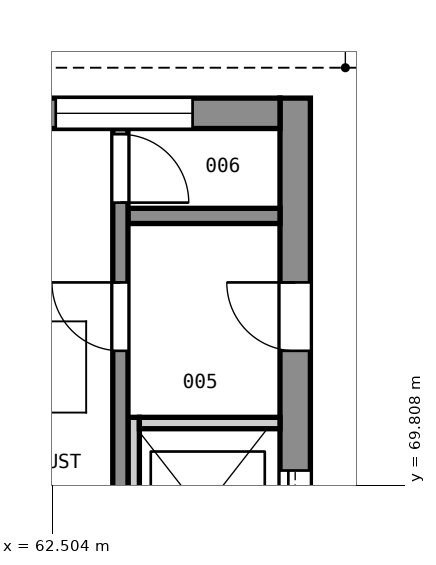
"""IFC4 building model, lengths in metres.
Left out: names, types, materials, properties, quantities, classifications, styles, units other than length and angle.
Written with IfcOpenShell. Run it as: python <this file> out.ifc"""

import sys

from ifc_helpers import new_model, si_unit, direction, frame, frame_2d, origin, place, context, subcontext, project, spatial, rectangle, extrude, element, fill, save


model = new_model("IFC4")
c1 = context("Model", 3, precision=1e-05, world=origin(), true_north=direction((0.0, 1.0)))
c2 = subcontext(c1, "Body", "Model", "MODEL_VIEW")
j1 = project(units=[si_unit("LENGTHUNIT", "METRE"), si_unit("PLANEANGLEUNIT", "RADIAN")], contexts=[c1])
p1 = place(None, origin())
s1 = spatial("IfcSite", under=j1, at=p1, CompositionType="ELEMENT")
p2 = place(p1, origin())
s2 = spatial("IfcBuilding", under=s1, at=p2, CompositionType="ELEMENT")
p3 = place(p2, frame((0.0, 0.0, 75.0)))
s3 = spatial("IfcBuildingStorey", under=s2, at=p3, CompositionType="ELEMENT", Elevation=75.0)
p4 = place(p3, frame((65.7, 60.1, 0.0), z_axis=(0.0, 0.0, 1.0), x_axis=(0.0, 1.0, 0.0)))
e1 = element("IfcWall", 1, at=p4, inside=s3, PredefinedType="SHEAR", context=c2, shape_type="SweptSolid", body=[
    extrude(rectangle(XDim=14.8, YDim=0.4, at=frame_2d((7.4, 0.0))), origin(), (0.0, 0.0, 1.0), 3.6),
])
p5 = place(p4, frame((8.8, 0.0, 0.0)))
e2 = element("IfcOpeningElement", 2, at=p5, cuts=e1, PredefinedType="OPENING", context=c2, shape_type="SweptSolid", body=[
    extrude(rectangle(XDim=1.1, YDim=2.1, at=frame_2d((0.55, 1.05))), frame((0.0, 0.21, 0.0), z_axis=(0.0, -1.0, 0.0), x_axis=(1.0, 0.0, 0.0)), (0.0, 0.0, 1.0), 0.42),
])
p6 = place(p4, frame((0.5, 0.0, 0.0)))
e3 = element("IfcOpeningElement", 3, at=p6, cuts=e1, PredefinedType="OPENING", context=c2, shape_type="SweptSolid", body=[
    extrude(rectangle(XDim=1.4, YDim=2.1, at=frame_2d((0.7, 1.05))), frame((0.0, 0.21, 0.0), z_axis=(0.0, -1.0, 0.0), x_axis=(1.0, 0.0, 0.0)), (0.0, 0.0, 1.0), 0.42),
])
p7 = place(p4, frame((6.5, 0.0, 2.2)))
e4 = element("IfcOpeningElement", 4, at=p7, cuts=e1, PredefinedType="OPENING", context=c2, shape_type="SweptSolid", body=[
    extrude(rectangle(XDim=1.8, YDim=1.2, at=frame_2d((0.9, 0.6))), frame((0.0, 0.21, 0.0), z_axis=(0.0, -1.0, 0.0), x_axis=(1.0, 0.0, 0.0)), (0.0, 0.0, 1.0), 0.42),
])
p8 = place(p4, frame((11.475, 0.0, 0.0)))
e5 = element("IfcOpeningElement", 5, at=p8, cuts=e1, PredefinedType="OPENING", context=c2, shape_type="SweptSolid", body=[
    extrude(rectangle(XDim=0.9, YDim=2.1, at=frame_2d((0.45, 1.05))), frame((0.0, 0.21, 0.0), z_axis=(0.0, -1.0, 0.0), x_axis=(1.0, 0.0, 0.0)), (0.0, 0.0, 1.0), 0.42),
])
p9 = place(p3, frame((61.4, 74.7, 0.0), z_axis=(0.0, 0.0, 1.0), x_axis=(1.0, 0.0, 0.0)))
e6 = element("IfcWall", 6, at=p9, inside=s3, PredefinedType="SHEAR", context=c2, shape_type="SweptSolid", body=[
    extrude(rectangle(XDim=4.1, YDim=0.4, at=frame_2d((2.05, 0.0))), origin(), (0.0, 0.0, 1.0), 3.6),
])
p10 = place(p9, frame((1.15, 0.0, 2.2)))
e7 = element("IfcOpeningElement", 7, at=p10, cuts=e6, PredefinedType="OPENING", context=c2, shape_type="SweptSolid", body=[
    extrude(rectangle(XDim=1.8, YDim=1.2, at=frame_2d((0.9, 0.6))), frame((0.0, 0.21, 0.0), z_axis=(0.0, -1.0, 0.0), x_axis=(1.0, 0.0, 0.0)), (0.0, 0.0, 1.0), 0.42),
])
p11 = place(p3, frame((63.575, 68.2, 0.0), z_axis=(0.0, 0.0, 1.0), x_axis=(0.0, 1.0, 0.0)))
e8 = element("IfcWall", 8, at=p11, inside=s3, PredefinedType="SOLIDWALL", context=c2, shape_type="SweptSolid", body=[
    extrude(rectangle(XDim=2.5, YDim=0.15, at=frame_2d((1.25, 0.0))), origin(), (0.0, 0.0, 1.0), 3.6),
])
p12 = place(p3, frame((63.65, 70.625, 0.0), z_axis=(0.0, 0.0, 1.0), x_axis=(1.0, 0.0, 0.0)))
e9 = element("IfcWall", 9, at=p12, inside=s3, PredefinedType="SOLIDWALL", context=c2, shape_type="SweptSolid", body=[
    extrude(rectangle(XDim=1.85, YDim=0.15, at=frame_2d((0.925, 0.0))), origin(), (0.0, 0.0, 1.0), 3.6),
])
p13 = place(p3, frame((63.5, 73.35, 0.0), z_axis=(0.0, 0.0, 1.0), x_axis=(1.0, 0.0, 0.0)))
e10 = element("IfcWall", 10, at=p13, inside=s3, PredefinedType="SOLIDWALL", context=c2, shape_type="SweptSolid", body=[
    extrude(rectangle(XDim=2.0, YDim=0.2, at=frame_2d((1.0, 0.0))), origin(), (0.0, 0.0, 1.0), 3.6),
])
p14 = place(p3, frame((63.4, 68.225, 0.0), z_axis=(0.0, 0.0, 1.0), x_axis=(0.0, 1.0, 0.0)))
e11 = element("IfcWall", 11, at=p14, inside=s3, PredefinedType="SOLIDWALL", context=c2, shape_type="SweptSolid", body=[
    extrude(rectangle(XDim=6.275, YDim=0.2, at=frame_2d((3.137, 0.0))), origin(), (0.0, 0.0, 1.0), 3.6),
])
p15 = place(p14, frame((3.35, 0.0, 0.0)))
e12 = element("IfcOpeningElement", 12, at=p15, cuts=e11, PredefinedType="OPENING", context=c2, shape_type="SweptSolid", body=[
    extrude(rectangle(XDim=0.9, YDim=2.1, at=frame_2d((0.45, 1.05))), frame((0.0, 0.11, 0.0), z_axis=(0.0, -1.0, 0.0), x_axis=(1.0, 0.0, 0.0)), (0.0, 0.0, 1.0), 0.22),
])
p16 = place(p14, frame((5.3, 0.0, 0.0)))
e13 = element("IfcOpeningElement", 13, at=p16, cuts=e11, PredefinedType="OPENING", context=c2, shape_type="SweptSolid", body=[
    extrude(rectangle(XDim=0.9, YDim=2.1, at=frame_2d((0.45, 1.05))), frame((0.0, 0.11, 0.0), z_axis=(0.0, -1.0, 0.0), x_axis=(1.0, 0.0, 0.0)), (0.0, 0.0, 1.0), 0.22),
])
p17 = place(p5, origin())
e14 = element("IfcDoor", 14, at=p17, inside=s3, OperationType="SLIDING_TO_LEFT", PredefinedType="DOOR", context=c2, shape_type="SweptSolid", body=[
    extrude(rectangle(XDim=1.1, YDim=2.1, at=frame_2d((0.55, 1.05))), frame((0.0, 0.025, 0.0), z_axis=(0.0, -1.0, 0.0), x_axis=(1.0, 0.0, 0.0)), (0.0, 0.0, 1.0), 0.05),
])
fill(e2, e14)
p18 = place(p10, origin())
e15 = element("IfcWindow", 15, at=p18, inside=s3, PartitioningType="SINGLE_PANEL", PredefinedType="USERDEFINED", context=c2, shape_type="SweptSolid", body=[
    extrude(rectangle(XDim=1.8, YDim=1.2, at=frame_2d((0.9, 0.6))), frame((0.0, 0.03, 0.0), z_axis=(0.0, -1.0, 0.0), x_axis=(1.0, 0.0, 0.0)), (0.0, 0.0, 1.0), 0.06),
])
fill(e7, e15)
p19 = place(p8, origin())
e16 = element("IfcDoor", 16, at=p19, inside=s3, OperationType="SINGLE_SWING_RIGHT", PredefinedType="DOOR", context=c2, shape_type="SweptSolid", body=[
    extrude(rectangle(XDim=0.9, YDim=2.1, at=frame_2d((0.45, 1.05))), frame((0.0, 0.025, 0.0), z_axis=(0.0, -1.0, 0.0), x_axis=(1.0, 0.0, 0.0)), (0.0, 0.0, 1.0), 0.05),
])
fill(e5, e16)
p20 = place(p15, origin())
e17 = element("IfcDoor", 17, at=p20, inside=s3, OperationType="SINGLE_SWING_RIGHT", PredefinedType="DOOR", context=c2, shape_type="SweptSolid", body=[
    extrude(rectangle(XDim=0.9, YDim=2.1, at=frame_2d((0.45, 1.05))), frame((0.0, 0.025, 0.0), z_axis=(0.0, -1.0, 0.0), x_axis=(1.0, 0.0, 0.0)), (0.0, 0.0, 1.0), 0.05),
])
fill(e12, e17)
p21 = place(p16, frame((0.9, 0.0, 0.0), z_axis=(0.0, 0.0, 1.0), x_axis=(-1.0, 0.0, 0.0)))
e18 = element("IfcDoor", 18, at=p21, inside=s3, OperationType="SINGLE_SWING_RIGHT", PredefinedType="DOOR", context=c2, shape_type="SweptSolid", body=[
    extrude(rectangle(XDim=0.9, YDim=2.1, at=frame_2d((0.45, 1.05))), frame((0.0, 0.025, 0.0), z_axis=(0.0, -1.0, 0.0), x_axis=(1.0, 0.0, 0.0)), (0.0, 0.0, 1.0), 0.05),
])
fill(e13, e18)
save(model, sys.argv[1])
